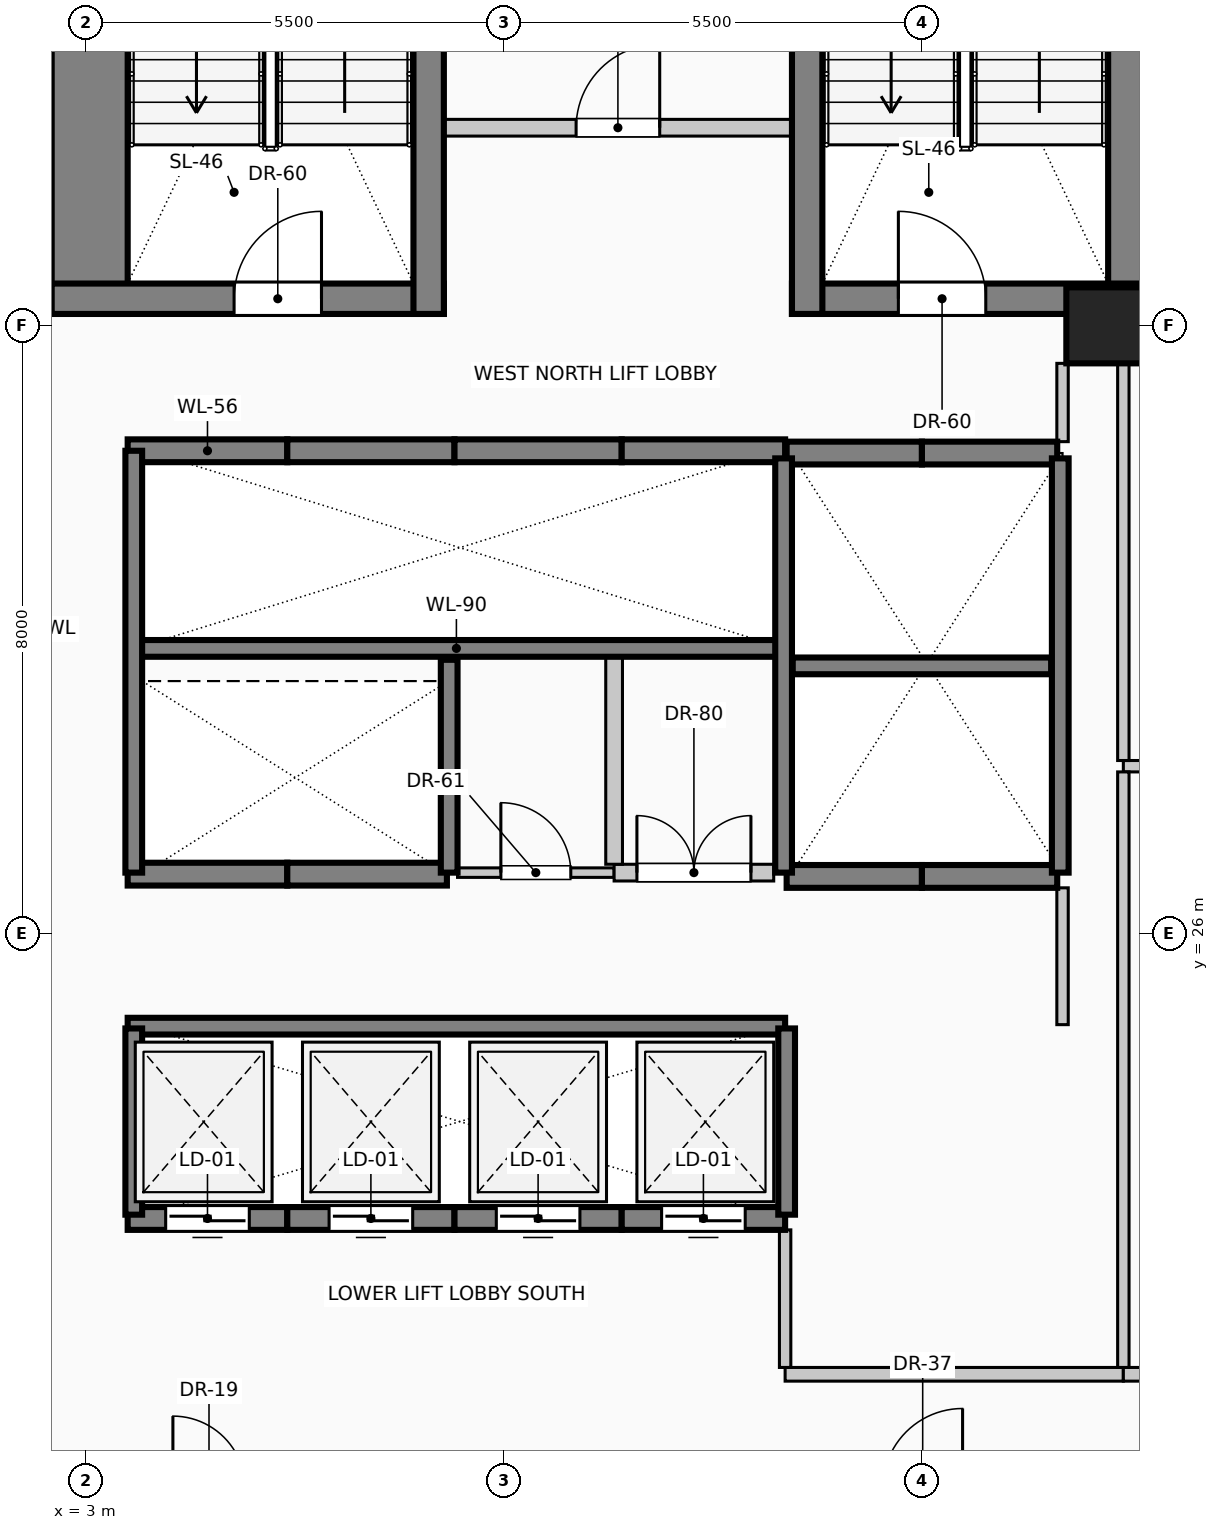
"""IFC4 building model, lengths in metres.
Left out: names, types, materials, properties, quantities, classifications, styles, units other than length and angle.
Written with IfcOpenShell. Run it as: python <this file> out.ifc"""

import sys

from ifc_helpers import new_model, si_unit, direction, frame, frame_2d, origin, origin_2d, place, context, subcontext, project, spatial, rectangle, circle, extrude, element, fill, save


model = new_model("IFC4")
c1 = context("Model", 3, precision=1e-05, world=origin(), true_north=direction((0.0, 1.0)))
c2 = subcontext(c1, "Body", "Model", "MODEL_VIEW")
j1 = project(units=[si_unit("LENGTHUNIT", "METRE"), si_unit("PLANEANGLEUNIT", "RADIAN")], contexts=[c1])
p1 = place(None, origin())
s1 = spatial("IfcSite", under=j1, at=p1, CompositionType="ELEMENT")
p2 = place(p1, origin())
s2 = spatial("IfcBuilding", under=s1, at=p2, CompositionType="ELEMENT")
p3 = place(p2, frame((0.0, 0.0, 70.6)))
s3 = spatial("IfcBuildingStorey", under=s2, at=p3, CompositionType="ELEMENT", Elevation=70.6)
for number, where, z_axis, x_axis in (
    (1, (3.05, 34.15, 0.0), (0.0, 0.0, 1.0), (0.0, 1.0, 0.0)),
    (2, (16.95, 34.15, 0.0), (0.0, 0.0, 1.0), (0.0, 1.0, 0.0)),
):
    element("IfcWall", number, at=place(p3, frame(where, z_axis=z_axis, x_axis=x_axis)), inside=s3, PredefinedType="SHEAR", context=c2, shape_type="SweptSolid", body=[
        extrude(rectangle(XDim=9.28, YDim=1.0, at=frame_2d((4.64, 0.0))), origin(), (0.0, 0.0, 1.0), 4.0),
    ])
p4 = place(p3, frame((2.55, 34.35, 0.0), z_axis=(0.0, 0.0, 1.0), x_axis=(1.0, 0.0, 0.0)))
e3 = element("IfcWall", 3, at=p4, inside=s3, PredefinedType="SHEAR", context=c2, shape_type="SweptSolid", body=[
    extrude(rectangle(XDim=5.16, YDim=0.4, at=frame_2d((2.58, 0.0))), origin(), (0.0, 0.0, 1.0), 4.0),
])
p5 = place(p4, frame((2.4, 0.0, 0.0)))
e4 = element("IfcOpeningElement", 4, at=p5, cuts=e3, PredefinedType="OPENING", context=c2, shape_type="SweptSolid", body=[
    extrude(rectangle(XDim=1.15, YDim=2.2, at=frame_2d((0.575, 1.1))), frame((0.0, 0.21, 0.0), z_axis=(0.0, -1.0, 0.0), x_axis=(1.0, 0.0, 0.0)), (0.0, 0.0, 1.0), 0.42),
])
p6 = place(p3, frame((12.29, 34.35, 0.0), z_axis=(0.0, 0.0, 1.0), x_axis=(1.0, 0.0, 0.0)))
e5 = element("IfcWall", 5, at=p6, inside=s3, PredefinedType="SHEAR", context=c2, shape_type="SweptSolid", body=[
    extrude(rectangle(XDim=5.16, YDim=0.4, at=frame_2d((2.58, 0.0))), origin(), (0.0, 0.0, 1.0), 4.0),
])
p7 = place(p6, frame((1.4, 0.0, 0.0)))
e6 = element("IfcOpeningElement", 6, at=p7, cuts=e5, PredefinedType="OPENING", context=c2, shape_type="SweptSolid", body=[
    extrude(rectangle(XDim=1.15, YDim=2.2, at=frame_2d((0.575, 1.1))), frame((0.0, 0.21, 0.0), z_axis=(0.0, -1.0, 0.0), x_axis=(1.0, 0.0, 0.0)), (0.0, 0.0, 1.0), 0.42),
])
for number, where, z_axis, x_axis in (
    (7, (7.51, 34.15, 0.0), (0.0, 0.0, 1.0), (0.0, 1.0, 0.0)),
    (8, (12.49, 34.15, 0.0), (0.0, 0.0, 1.0), (0.0, 1.0, 0.0)),
):
    element("IfcWall", number, at=place(p3, frame(where, z_axis=z_axis, x_axis=x_axis)), inside=s3, PredefinedType="SHEAR", context=c2, shape_type="SweptSolid", body=[
        extrude(rectangle(XDim=9.28, YDim=0.4, at=frame_2d((4.64, 0.0))), origin(), (0.0, 0.0, 1.0), 4.0),
    ])
p8 = place(p3, frame((16.4, 34.0, 0.0), z_axis=(0.0, 0.0, 1.0), x_axis=(1.0, 0.0, 0.0)))
e9 = element("IfcColumn", 9, at=p8, inside=s3, PredefinedType="COLUMN", context=c2, shape_type="SweptSolid", body=[
    extrude(circle(Radius=0.5, at=origin_2d()), origin(), (0.0, 0.0, 1.0), 4.0),
])
p9 = place(p3, frame((5.65, 22.25, 0.0), z_axis=(0.0, 0.0, 1.0), x_axis=(-1.0, 0.0, 0.0)))
e10 = element("IfcWall", 10, at=p9, inside=s3, PredefinedType="SOLIDWALL", context=c2, shape_type="SweptSolid", body=[
    extrude(rectangle(XDim=2.1, YDim=0.3, at=frame_2d((1.05, 0.0))), origin(), (0.0, 0.0, 1.0), 4.0),
])
p10 = place(p9, frame((0.5, 0.0, 0.0)))
e11 = element("IfcOpeningElement", 11, at=p10, cuts=e10, PredefinedType="OPENING", context=c2, shape_type="SweptSolid", body=[
    extrude(rectangle(XDim=1.1, YDim=2.2, at=frame_2d((0.55, 1.1))), frame((0.0, 0.16, 0.0), z_axis=(0.0, -1.0, 0.0), x_axis=(1.0, 0.0, 0.0)), (0.0, 0.0, 1.0), 0.32),
])
p11 = place(p3, frame((7.85, 22.25, 0.0), z_axis=(0.0, 0.0, 1.0), x_axis=(-1.0, 0.0, 0.0)))
e12 = element("IfcWall", 12, at=p11, inside=s3, PredefinedType="SOLIDWALL", context=c2, shape_type="SweptSolid", body=[
    extrude(rectangle(XDim=2.2, YDim=0.3, at=frame_2d((1.1, 0.0))), origin(), (0.0, 0.0, 1.0), 4.0),
])
p12 = place(p11, frame((0.55, 0.0, 0.0)))
e13 = element("IfcOpeningElement", 13, at=p12, cuts=e12, PredefinedType="OPENING", context=c2, shape_type="SweptSolid", body=[
    extrude(rectangle(XDim=1.1, YDim=2.2, at=frame_2d((0.55, 1.1))), frame((0.0, 0.16, 0.0), z_axis=(0.0, -1.0, 0.0), x_axis=(1.0, 0.0, 0.0)), (0.0, 0.0, 1.0), 0.32),
])
p13 = place(p3, frame((10.05, 22.25, 0.0), z_axis=(0.0, 0.0, 1.0), x_axis=(-1.0, 0.0, 0.0)))
e14 = element("IfcWall", 14, at=p13, inside=s3, PredefinedType="SOLIDWALL", context=c2, shape_type="SweptSolid", body=[
    extrude(rectangle(XDim=2.2, YDim=0.3, at=frame_2d((1.1, 0.0))), origin(), (0.0, 0.0, 1.0), 4.0),
])
p14 = place(p13, frame((0.55, 0.0, 0.0)))
e15 = element("IfcOpeningElement", 15, at=p14, cuts=e14, PredefinedType="OPENING", context=c2, shape_type="SweptSolid", body=[
    extrude(rectangle(XDim=1.1, YDim=2.2, at=frame_2d((0.55, 1.1))), frame((0.0, 0.16, 0.0), z_axis=(0.0, -1.0, 0.0), x_axis=(1.0, 0.0, 0.0)), (0.0, 0.0, 1.0), 0.32),
])
p15 = place(p3, frame((12.2, 22.25, 0.0), z_axis=(0.0, 0.0, 1.0), x_axis=(-1.0, 0.0, 0.0)))
e16 = element("IfcWall", 16, at=p15, inside=s3, PredefinedType="SOLIDWALL", context=c2, shape_type="SweptSolid", body=[
    extrude(rectangle(XDim=2.15, YDim=0.3, at=frame_2d((1.075, 0.0))), origin(), (0.0, 0.0, 1.0), 4.0),
])
p16 = place(p15, frame((0.525, 0.0, 0.0)))
e17 = element("IfcOpeningElement", 17, at=p16, cuts=e16, PredefinedType="OPENING", context=c2, shape_type="SweptSolid", body=[
    extrude(rectangle(XDim=1.1, YDim=2.2, at=frame_2d((0.55, 1.1))), frame((0.0, 0.16, 0.0), z_axis=(0.0, -1.0, 0.0), x_axis=(1.0, 0.0, 0.0)), (0.0, 0.0, 1.0), 0.32),
])
for number, where, z_axis, x_axis in (
    (18, (14.0, 26.75, 0.0), (0.0, 0.0, 1.0), (-1.0, 0.0, 0.0)),
    (19, (15.78, 26.75, 0.0), (0.0, 0.0, 1.0), (-1.0, 0.0, 0.0)),
    (20, (12.22, 32.32, 0.0), (0.0, 0.0, 1.0), (1.0, 0.0, 0.0)),
    (21, (14.0, 32.32, 0.0), (0.0, 0.0, 1.0), (1.0, 0.0, 0.0)),
):
    element("IfcWall", number, at=place(p3, frame(where, z_axis=z_axis, x_axis=x_axis)), inside=s3, PredefinedType="SOLIDWALL", context=c2, shape_type="SweptSolid", body=[
        extrude(rectangle(XDim=1.78, YDim=0.3, at=frame_2d((0.89, 0.0))), origin(), (0.0, 0.0, 1.0), 4.0),
    ])
p17 = place(p3, frame((3.55, 32.35, 0.0), z_axis=(0.0, 0.0, 1.0), x_axis=(1.0, 0.0, 0.0)))
e22 = element("IfcWall", 22, at=p17, inside=s3, PredefinedType="SOLIDWALL", context=c2, shape_type="SweptSolid", body=[
    extrude(rectangle(XDim=2.1, YDim=0.3, at=frame_2d((1.05, 0.0))), origin(), (0.0, 0.0, 1.0), 4.0),
])
p18 = place(p3, frame((5.65, 32.35, 0.0), z_axis=(0.0, 0.0, 1.0), x_axis=(1.0, 0.0, 0.0)))
e23 = element("IfcWall", 23, at=p18, inside=s3, PredefinedType="SOLIDWALL", context=c2, shape_type="SweptSolid", body=[
    extrude(rectangle(XDim=2.2, YDim=0.3, at=frame_2d((1.1, 0.0))), origin(), (0.0, 0.0, 1.0), 4.0),
])
p19 = place(p3, frame((7.85, 32.35, 0.0), z_axis=(0.0, 0.0, 1.0), x_axis=(1.0, 0.0, 0.0)))
e24 = element("IfcWall", 24, at=p19, inside=s3, PredefinedType="SOLIDWALL", context=c2, shape_type="SweptSolid", body=[
    extrude(rectangle(XDim=2.2, YDim=0.3, at=frame_2d((1.1, 0.0))), origin(), (0.0, 0.0, 1.0), 4.0),
])
p20 = place(p3, frame((10.05, 32.35, 0.0), z_axis=(0.0, 0.0, 1.0), x_axis=(1.0, 0.0, 0.0)))
e25 = element("IfcWall", 25, at=p20, inside=s3, PredefinedType="SOLIDWALL", context=c2, shape_type="SweptSolid", body=[
    extrude(rectangle(XDim=2.15, YDim=0.3, at=frame_2d((1.075, 0.0))), origin(), (0.0, 0.0, 1.0), 4.0),
])
p21 = place(p3, frame((5.65, 26.78, 0.0), z_axis=(0.0, 0.0, 1.0), x_axis=(-1.0, 0.0, 0.0)))
e26 = element("IfcWall", 26, at=p21, inside=s3, PredefinedType="SOLIDWALL", context=c2, shape_type="SweptSolid", body=[
    extrude(rectangle(XDim=2.1, YDim=0.3, at=frame_2d((1.05, 0.0))), origin(), (0.0, 0.0, 1.0), 4.0),
])
p22 = place(p3, frame((7.75, 26.78, 0.0), z_axis=(0.0, 0.0, 1.0), x_axis=(-1.0, 0.0, 0.0)))
e27 = element("IfcWall", 27, at=p22, inside=s3, PredefinedType="SOLIDWALL", context=c2, shape_type="SweptSolid", body=[
    extrude(rectangle(XDim=2.1, YDim=0.3, at=frame_2d((1.05, 0.0))), origin(), (0.0, 0.0, 1.0), 4.0),
])
p23 = place(p3, frame((3.55, 29.75, 0.0), z_axis=(0.0, 0.0, 1.0), x_axis=(1.0, 0.0, 0.0)))
e28 = element("IfcWall", 28, at=p23, inside=s3, PredefinedType="SOLIDWALL", context=c2, shape_type="SweptSolid", body=[
    extrude(rectangle(XDim=8.65, YDim=0.22, at=frame_2d((4.325, 0.0))), origin(), (0.0, 0.0, 1.0), 4.0),
])
p24 = place(p3, frame((3.63, 26.8, 0.0), z_axis=(0.0, 0.0, 1.0), x_axis=(0.0, 1.0, 0.0)))
e29 = element("IfcWall", 29, at=p24, inside=s3, PredefinedType="SOLIDWALL", context=c2, shape_type="SweptSolid", body=[
    extrude(rectangle(XDim=5.55, YDim=0.22, at=frame_2d((2.775, 0.0))), origin(), (0.0, 0.0, 1.0), 4.0),
])
p25 = place(p3, frame((7.78, 26.8, 0.0), z_axis=(0.0, 0.0, 1.0), x_axis=(0.0, 1.0, 0.0)))
e30 = element("IfcWall", 30, at=p25, inside=s3, PredefinedType="SOLIDWALL", context=c2, shape_type="SweptSolid", body=[
    extrude(rectangle(XDim=2.8, YDim=0.22, at=frame_2d((1.4, 0.0))), origin(), (0.0, 0.0, 1.0), 4.0),
])
for number, where, z_axis, x_axis in (
    (31, (12.18, 26.8, 0.0), (0.0, 0.0, 1.0), (0.0, 1.0, 0.0)),
    (32, (15.82, 26.8, 0.0), (0.0, 0.0, 1.0), (0.0, 1.0, 0.0)),
):
    element("IfcWall", number, at=place(p3, frame(where, z_axis=z_axis, x_axis=x_axis)), inside=s3, PredefinedType="SOLIDWALL", context=c2, shape_type="SweptSolid", body=[
        extrude(rectangle(XDim=5.45, YDim=0.22, at=frame_2d((2.725, 0.0))), origin(), (0.0, 0.0, 1.0), 4.0),
    ])
p26 = place(p3, frame((12.3, 29.52, 0.0), z_axis=(0.0, 0.0, 1.0), x_axis=(1.0, 0.0, 0.0)))
e33 = element("IfcWall", 33, at=p26, inside=s3, PredefinedType="SOLIDWALL", context=c2, shape_type="SweptSolid", body=[
    extrude(rectangle(XDim=3.4, YDim=0.22, at=frame_2d((1.7, 0.0))), origin(), (0.0, 0.0, 1.0), 4.0),
])
p27 = place(p3, frame((3.55, 24.78, 0.0), z_axis=(0.0, 0.0, 1.0), x_axis=(1.0, 0.0, 0.0)))
e34 = element("IfcWall", 34, at=p27, inside=s3, PredefinedType="SOLIDWALL", context=c2, shape_type="SweptSolid", body=[
    extrude(rectangle(XDim=8.65, YDim=0.22, at=frame_2d((4.325, 0.0))), origin(), (0.0, 0.0, 1.0), 4.0),
])
for number, where, z_axis, x_axis in (
    (35, (3.63, 22.3, 0.0), (0.0, 0.0, 1.0), (0.0, 1.0, 0.0)),
    (36, (12.22, 22.3, 0.0), (0.0, 0.0, 1.0), (0.0, 1.0, 0.0)),
):
    element("IfcWall", number, at=place(p3, frame(where, z_axis=z_axis, x_axis=x_axis)), inside=s3, PredefinedType="SOLIDWALL", context=c2, shape_type="SweptSolid", body=[
        extrude(rectangle(XDim=2.45, YDim=0.22, at=frame_2d((1.225, 0.0))), origin(), (0.0, 0.0, 1.0), 4.0),
    ])
p28 = place(p3, frame((7.51, 36.6, 0.0), z_axis=(0.0, 0.0, 1.0), x_axis=(1.0, 0.0, 0.0)))
e37 = element("IfcWall", 37, at=p28, inside=s3, PredefinedType="PARTITIONING", context=c2, shape_type="SweptSolid", body=[
    extrude(rectangle(XDim=4.98, YDim=0.22, at=frame_2d((2.49, 0.0))), origin(), (0.0, 0.0, 1.0), 3.7),
])
p29 = place(p28, frame((1.94, 0.0, 0.0)))
e38 = element("IfcOpeningElement", 38, at=p29, cuts=e37, PredefinedType="OPENING", context=c2, shape_type="SweptSolid", body=[
    extrude(rectangle(XDim=1.1, YDim=2.2, at=frame_2d((0.55, 1.1))), frame((0.0, 0.12, 0.0), z_axis=(0.0, -1.0, 0.0), x_axis=(1.0, 0.0, 0.0)), (0.0, 0.0, 1.0), 0.24),
])
p30 = place(p3, frame((12.2, 20.2, 0.0), z_axis=(0.0, 0.0, 1.0), x_axis=(1.0, 0.0, 0.0)))
e39 = element("IfcWall", 39, at=p30, inside=s3, PredefinedType="PARTITIONING", context=c2, shape_type="SweptSolid", body=[
    extrude(rectangle(XDim=4.45, YDim=0.18, at=frame_2d((2.225, 0.0))), origin(), (0.0, 0.0, 1.0), 3.7),
])
p31 = place(p3, frame((16.65, 20.2, 0.0), z_axis=(0.0, 0.0, 1.0), x_axis=(1.0, 0.0, 0.0)))
e40 = element("IfcWall", 40, at=p31, inside=s3, PredefinedType="PARTITIONING", context=c2, shape_type="SweptSolid", body=[
    extrude(rectangle(XDim=21.35, YDim=0.18, at=frame_2d((10.675, 0.0))), origin(), (0.0, 0.0, 1.0), 3.7),
])
p32 = place(p31, frame((10.15, 0.0, 0.0)))
e41 = element("IfcOpeningElement", 41, at=p32, cuts=e40, PredefinedType="OPENING", context=c2, shape_type="SweptSolid", body=[
    extrude(rectangle(XDim=1.05, YDim=2.15, at=frame_2d((0.525, 1.075))), frame((0.0, 0.1, 0.0), z_axis=(0.0, -1.0, 0.0), x_axis=(1.0, 0.0, 0.0)), (0.0, 0.0, 1.0), 0.2),
])
p33 = place(p3, frame((7.89, 26.8, 0.0), z_axis=(0.0, 0.0, 1.0), x_axis=(1.0, 0.0, 0.0)))
e42 = element("IfcWall", 42, at=p33, inside=s3, PredefinedType="PARTITIONING", context=c2, shape_type="SweptSolid", body=[
    extrude(rectangle(XDim=2.06, YDim=0.125, at=frame_2d((1.03, 0.0))), origin(), (0.0, 0.0, 1.0), 3.7),
])
p34 = place(p33, frame((0.57, 0.0, 0.0)))
e43 = element("IfcOpeningElement", 43, at=p34, cuts=e42, PredefinedType="OPENING", context=c2, shape_type="SweptSolid", body=[
    extrude(rectangle(XDim=0.92, YDim=2.1, at=frame_2d((0.46, 1.05))), frame((0.0, 0.073, 0.0), z_axis=(0.0, -1.0, 0.0), x_axis=(1.0, 0.0, 0.0)), (0.0, 0.0, 1.0), 0.145),
])
p35 = place(p3, frame((9.95, 26.8, 0.0), z_axis=(0.0, 0.0, 1.0), x_axis=(1.0, 0.0, 0.0)))
e44 = element("IfcWall", 44, at=p35, inside=s3, PredefinedType="PARTITIONING", context=c2, shape_type="SweptSolid", body=[
    extrude(rectangle(XDim=2.1, YDim=0.22, at=frame_2d((1.05, 0.0))), origin(), (0.0, 0.0, 1.0), 3.7),
])
p36 = place(p35, frame((0.3, 0.0, 0.0)))
e45 = element("IfcOpeningElement", 45, at=p36, cuts=e44, PredefinedType="OPENING", context=c2, shape_type="SweptSolid", body=[
    extrude(rectangle(XDim=1.5, YDim=2.25, at=frame_2d((0.75, 1.125))), frame((0.0, 0.12, 0.0), z_axis=(0.0, -1.0, 0.0), x_axis=(1.0, 0.0, 0.0)), (0.0, 0.0, 1.0), 0.24),
])
p37 = place(p3, frame((16.65, 28.2, 0.0), z_axis=(0.0, 0.0, 1.0), x_axis=(1.0, 0.0, 0.0)))
e46 = element("IfcWall", 46, at=p37, inside=s3, PredefinedType="PARTITIONING", context=c2, shape_type="SweptSolid", body=[
    extrude(rectangle(XDim=21.35, YDim=0.15, at=frame_2d((10.675, 0.0))), origin(), (0.0, 0.0, 1.0), 3.7),
])
p38 = place(p3, frame((9.95, 26.91, 0.0), z_axis=(0.0, 0.0, 1.0), x_axis=(0.0, 1.0, 0.0)))
e47 = element("IfcWall", 47, at=p38, inside=s3, PredefinedType="PARTITIONING", context=c2, shape_type="SweptSolid", body=[
    extrude(rectangle(XDim=2.73, YDim=0.22, at=frame_2d((1.365, 0.0))), origin(), (0.0, 0.0, 1.0), 3.7),
])
p39 = place(p3, frame((12.2, 20.29, 0.0), z_axis=(0.0, 0.0, 1.0), x_axis=(0.0, 1.0, 0.0)))
e48 = element("IfcWall", 48, at=p39, inside=s3, PredefinedType="PARTITIONING", context=c2, shape_type="SweptSolid", body=[
    extrude(rectangle(XDim=1.81, YDim=0.15, at=frame_2d((0.905, 0.0))), origin(), (0.0, 0.0, 1.0), 3.7),
])
p40 = place(p3, frame((15.85, 24.8, 0.0), z_axis=(0.0, 0.0, 1.0), x_axis=(0.0, 1.0, 0.0)))
e49 = element("IfcWall", 49, at=p40, inside=s3, PredefinedType="PARTITIONING", context=c2, shape_type="SweptSolid", body=[
    extrude(rectangle(XDim=1.8, YDim=0.15, at=frame_2d((0.9, 0.0))), origin(), (0.0, 0.0, 1.0), 3.7),
])
p41 = place(p3, frame((15.85, 32.47, 0.0), z_axis=(0.0, 0.0, 1.0), x_axis=(0.0, 1.0, 0.0)))
e50 = element("IfcWall", 50, at=p41, inside=s3, PredefinedType="PARTITIONING", context=c2, shape_type="SweptSolid", body=[
    extrude(rectangle(XDim=1.03, YDim=0.15, at=frame_2d((0.515, 0.0))), origin(), (0.0, 0.0, 1.0), 3.7),
])
p42 = place(p3, frame((16.65, 20.29, 0.0), z_axis=(0.0, 0.0, 1.0), x_axis=(0.0, 1.0, 0.0)))
e51 = element("IfcWall", 51, at=p42, inside=s3, PredefinedType="PARTITIONING", context=c2, shape_type="SweptSolid", body=[
    extrude(rectangle(XDim=7.835, YDim=0.15, at=frame_2d((3.917, 0.0))), origin(), (0.0, 0.0, 1.0), 2.995),
])
p43 = place(p3, frame((16.65, 28.275, 0.0), z_axis=(0.0, 0.0, 1.0), x_axis=(0.0, 1.0, 0.0)))
e52 = element("IfcWall", 52, at=p43, inside=s3, PredefinedType="PARTITIONING", context=c2, shape_type="SweptSolid", body=[
    extrude(rectangle(XDim=5.225, YDim=0.15, at=frame_2d((2.613, 0.0))), origin(), (0.0, 0.0, 1.0), 2.995),
])
p44 = place(p10, origin())
e53 = element("IfcDoor", 53, at=p44, inside=s3, OperationType="SLIDING_TO_LEFT", PredefinedType="DOOR", context=c2, shape_type="SweptSolid", body=[
    extrude(rectangle(XDim=1.1, YDim=2.2, at=frame_2d((0.55, 1.1))), frame((0.0, 0.025, 0.0), z_axis=(0.0, -1.0, 0.0), x_axis=(1.0, 0.0, 0.0)), (0.0, 0.0, 1.0), 0.05),
])
fill(e11, e53)
p45 = place(p12, origin())
e54 = element("IfcDoor", 54, at=p45, inside=s3, OperationType="SLIDING_TO_RIGHT", PredefinedType="DOOR", context=c2, shape_type="SweptSolid", body=[
    extrude(rectangle(XDim=1.1, YDim=2.2, at=frame_2d((0.55, 1.1))), frame((0.0, 0.025, 0.0), z_axis=(0.0, -1.0, 0.0), x_axis=(1.0, 0.0, 0.0)), (0.0, 0.0, 1.0), 0.05),
])
fill(e13, e54)
p46 = place(p14, origin())
e55 = element("IfcDoor", 55, at=p46, inside=s3, OperationType="SLIDING_TO_LEFT", PredefinedType="DOOR", context=c2, shape_type="SweptSolid", body=[
    extrude(rectangle(XDim=1.1, YDim=2.2, at=frame_2d((0.55, 1.1))), frame((0.0, 0.025, 0.0), z_axis=(0.0, -1.0, 0.0), x_axis=(1.0, 0.0, 0.0)), (0.0, 0.0, 1.0), 0.05),
])
fill(e15, e55)
p47 = place(p16, origin())
e56 = element("IfcDoor", 56, at=p47, inside=s3, OperationType="SLIDING_TO_RIGHT", PredefinedType="DOOR", context=c2, shape_type="SweptSolid", body=[
    extrude(rectangle(XDim=1.1, YDim=2.2, at=frame_2d((0.55, 1.1))), frame((0.0, 0.025, 0.0), z_axis=(0.0, -1.0, 0.0), x_axis=(1.0, 0.0, 0.0)), (0.0, 0.0, 1.0), 0.05),
])
fill(e17, e56)
p48 = place(p5, origin())
e57 = element("IfcDoor", 57, at=p48, inside=s3, OperationType="SINGLE_SWING_RIGHT", PredefinedType="DOOR", context=c2, shape_type="SweptSolid", body=[
    extrude(rectangle(XDim=1.15, YDim=2.2, at=frame_2d((0.575, 1.1))), frame((0.0, 0.025, 0.0), z_axis=(0.0, -1.0, 0.0), x_axis=(1.0, 0.0, 0.0)), (0.0, 0.0, 1.0), 0.05),
])
fill(e4, e57)
p49 = place(p7, origin())
e58 = element("IfcDoor", 58, at=p49, inside=s3, OperationType="SINGLE_SWING_LEFT", PredefinedType="DOOR", context=c2, shape_type="SweptSolid", body=[
    extrude(rectangle(XDim=1.15, YDim=2.2, at=frame_2d((0.575, 1.1))), frame((0.0, 0.025, 0.0), z_axis=(0.0, -1.0, 0.0), x_axis=(1.0, 0.0, 0.0)), (0.0, 0.0, 1.0), 0.05),
])
fill(e6, e58)
p50 = place(p29, origin())
e59 = element("IfcDoor", 59, at=p50, inside=s3, OperationType="SINGLE_SWING_RIGHT", PredefinedType="DOOR", context=c2, shape_type="SweptSolid", body=[
    extrude(rectangle(XDim=1.1, YDim=2.2, at=frame_2d((0.55, 1.1))), frame((0.0, 0.025, 0.0), z_axis=(0.0, -1.0, 0.0), x_axis=(1.0, 0.0, 0.0)), (0.0, 0.0, 1.0), 0.05),
])
fill(e38, e59)
p51 = place(p34, origin())
e60 = element("IfcDoor", 60, at=p51, inside=s3, OperationType="SINGLE_SWING_LEFT", PredefinedType="DOOR", context=c2, shape_type="SweptSolid", body=[
    extrude(rectangle(XDim=0.92, YDim=2.1, at=frame_2d((0.46, 1.05))), frame((0.0, 0.025, 0.0), z_axis=(0.0, -1.0, 0.0), x_axis=(1.0, 0.0, 0.0)), (0.0, 0.0, 1.0), 0.05),
])
fill(e43, e60)
p52 = place(p36, origin())
e61 = element("IfcDoor", 61, at=p52, inside=s3, OperationType="DOUBLE_DOOR_SINGLE_SWING", PredefinedType="DOOR", context=c2, shape_type="SweptSolid", body=[
    extrude(rectangle(XDim=1.5, YDim=2.25, at=frame_2d((0.75, 1.125))), frame((0.0, 0.025, 0.0), z_axis=(0.0, -1.0, 0.0), x_axis=(1.0, 0.0, 0.0)), (0.0, 0.0, 1.0), 0.05),
])
fill(e45, e61)
save(model, sys.argv[1])
